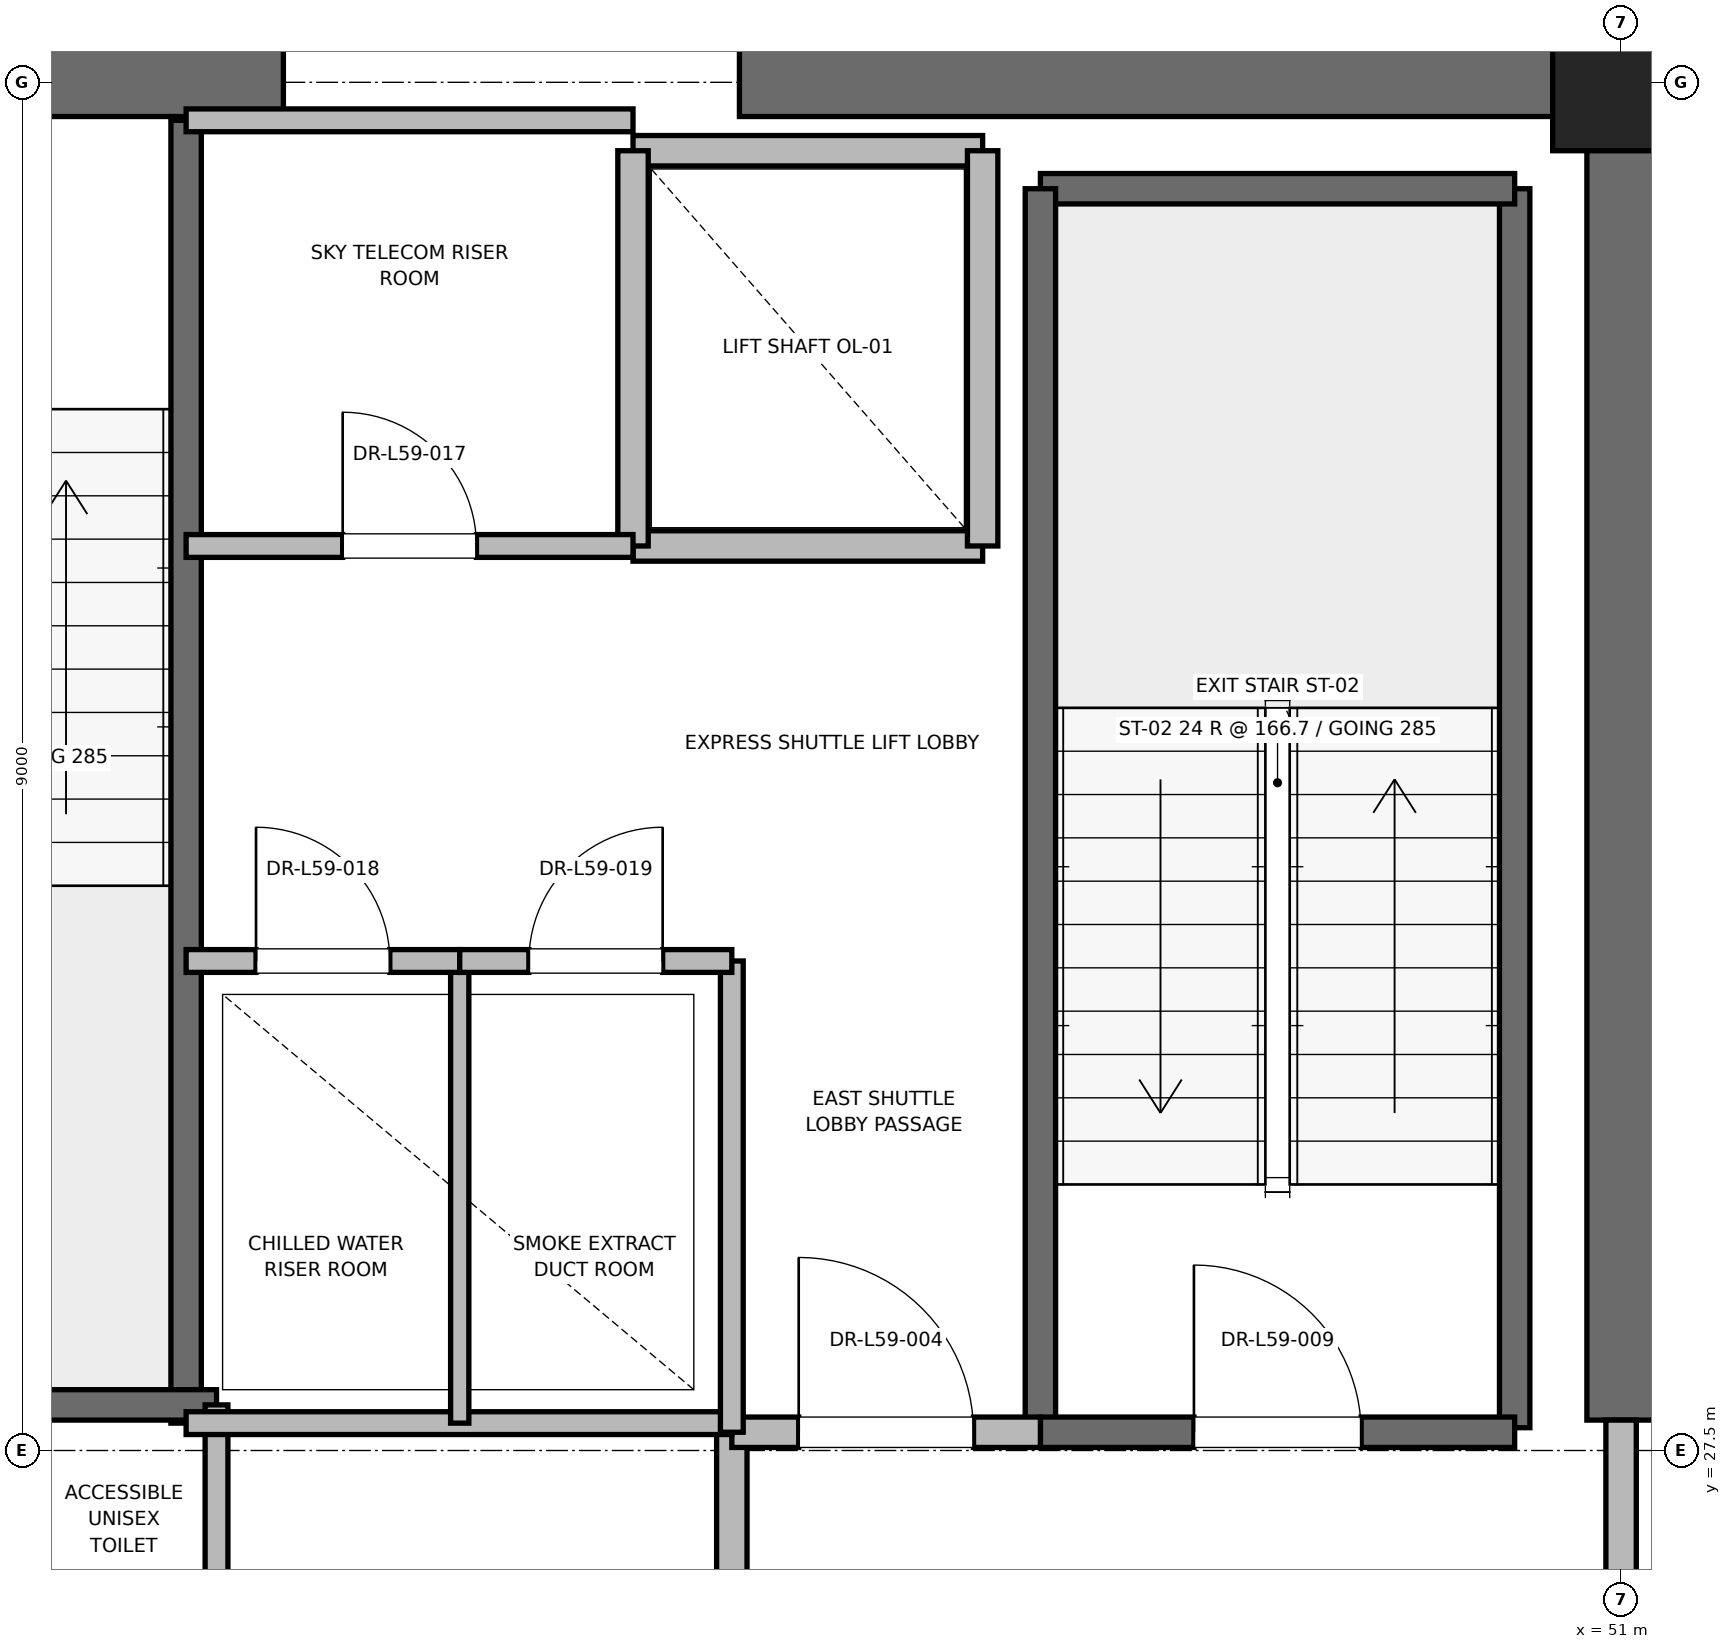
"""IFC4 building model, lengths in metres.
Left out: names, types, materials, properties, quantities, classifications, styles, units other than length and angle.
Written with IfcOpenShell. Run it as: python <this file> out.ifc"""

import sys

from ifc_helpers import new_model, si_unit, direction, frame, frame_2d, origin, origin_2d, place, context, subcontext, project, spatial, rectangle, extrude, element, fill, save


model = new_model("IFC4")
c1 = context("Model", 3, precision=1e-05, world=origin(), true_north=direction((0.0, 1.0)))
c2 = subcontext(c1, "Body", "Model", "MODEL_VIEW")
j1 = project(units=[si_unit("LENGTHUNIT", "METRE"), si_unit("PLANEANGLEUNIT", "RADIAN")], contexts=[c1])
p1 = place(None, origin())
s1 = spatial("IfcSite", under=j1, at=p1, CompositionType="ELEMENT")
p2 = place(p1, origin())
s2 = spatial("IfcBuilding", under=s1, at=p2, CompositionType="ELEMENT")
p3 = place(p2, frame((0.0, 0.0, 255.2)))
s3 = spatial("IfcBuildingStorey", under=s2, at=p3, CompositionType="ELEMENT", Elevation=255.2)
p4 = place(p3, frame((51.0, 36.5, 0.0), z_axis=(0.0, 0.0, 1.0), x_axis=(1.0, 0.0, 0.0)))
e1 = element("IfcColumn", 1, at=p4, inside=s3, PredefinedType="PILASTER", context=c2, shape_type="SweptSolid", body=[
    extrude(rectangle(XDim=0.9, YDim=0.9, at=origin_2d()), origin(), (0.0, 0.0, 1.0), 4.0),
])
p5 = place(p3, frame((37.8, 36.5, 0.0), z_axis=(0.0, 0.0, 1.0), x_axis=(1.0, 0.0, 0.0)))
e2 = element("IfcWall", 2, at=p5, inside=s3, PredefinedType="SHEAR", context=c2, shape_type="SweptSolid", body=[
    extrude(rectangle(XDim=4.4, YDim=0.45, at=frame_2d((2.2, 0.0))), origin(), (0.0, 0.0, 1.0), 3.785),
])
p6 = place(p5, frame((1.65, 0.0, 0.0)))
e3 = element("IfcOpeningElement", 3, at=p6, cuts=e2, PredefinedType="OPENING", context=c2, shape_type="SweptSolid", body=[
    extrude(rectangle(XDim=1.1, YDim=2.15, at=frame_2d((0.55, 1.075))), frame((0.0, 0.225, 0.0), z_axis=(0.0, -1.0, 0.0), x_axis=(1.0, 0.0, 0.0)), (0.0, 0.0, 1.0), 0.45),
])
p7 = place(p3, frame((45.2, 36.5, 0.0), z_axis=(0.0, 0.0, 1.0), x_axis=(1.0, 0.0, 0.0)))
e4 = element("IfcWall", 4, at=p7, inside=s3, PredefinedType="SHEAR", context=c2, shape_type="SweptSolid", body=[
    extrude(rectangle(XDim=5.8, YDim=0.45, at=frame_2d((2.9, 0.0))), origin(), (0.0, 0.0, 1.0), 3.785),
])
p8 = place(p3, frame((51.0, 27.7, 0.0), z_axis=(0.0, 0.0, 1.0), x_axis=(0.0, 1.0, 0.0)))
e5 = element("IfcWall", 5, at=p8, inside=s3, PredefinedType="SHEAR", context=c2, shape_type="SweptSolid", body=[
    extrude(rectangle(XDim=8.8, YDim=0.45, at=frame_2d((4.4, 0.0))), origin(), (0.0, 0.0, 1.0), 3.785),
])
p9 = place(p3, frame((50.3, 27.65, 0.0), z_axis=(0.0, 0.0, 1.0), x_axis=(0.0, 1.0, 0.0)))
e6 = element("IfcWall", 6, at=p9, inside=s3, PredefinedType="SOLIDWALL", context=c2, shape_type="SweptSolid", body=[
    extrude(rectangle(XDim=8.15, YDim=0.2, at=frame_2d((4.075, 0.0))), origin(), (0.0, 0.0, 1.0), 3.785),
])
p10 = place(p3, frame((47.18, 35.8, 0.0), z_axis=(0.0, 0.0, 1.0), x_axis=(1.0, 0.0, 0.0)))
e7 = element("IfcWall", 7, at=p10, inside=s3, PredefinedType="SOLIDWALL", context=c2, shape_type="SweptSolid", body=[
    extrude(rectangle(XDim=3.12, YDim=0.2, at=frame_2d((1.56, 0.0))), origin(), (0.0, 0.0, 1.0), 3.785),
])
p11 = place(p3, frame((47.18, 27.62, 0.0), z_axis=(0.0, 0.0, 1.0), x_axis=(0.0, 1.0, 0.0)))
e8 = element("IfcWall", 8, at=p11, inside=s3, PredefinedType="SOLIDWALL", context=c2, shape_type="SweptSolid", body=[
    extrude(rectangle(XDim=8.18, YDim=0.2, at=frame_2d((4.09, 0.0))), origin(), (0.0, 0.0, 1.0), 3.785),
])
p12 = place(p3, frame((47.18, 27.62, 0.0), z_axis=(0.0, 0.0, 1.0), x_axis=(1.0, 0.0, 0.0)))
e9 = element("IfcWall", 9, at=p12, inside=s3, PredefinedType="SOLIDWALL", context=c2, shape_type="SweptSolid", body=[
    extrude(rectangle(XDim=3.12, YDim=0.2, at=frame_2d((1.56, 0.0))), origin(), (0.0, 0.0, 1.0), 3.785),
])
p13 = place(p12, frame((1.01, 0.0, 0.0)))
e10 = element("IfcOpeningElement", 10, at=p13, cuts=e9, PredefinedType="OPENING", context=c2, shape_type="SweptSolid", body=[
    extrude(rectangle(XDim=1.1, YDim=2.15, at=frame_2d((0.55, 1.075))), frame((0.0, 0.1, 0.0), z_axis=(0.0, -1.0, 0.0), x_axis=(1.0, 0.0, 0.0)), (0.0, 0.0, 1.0), 0.2),
])
p14 = place(p3, frame((41.56, 27.68, 0.0), z_axis=(0.0, 0.0, 1.0), x_axis=(0.0, 1.0, 0.0)))
e11 = element("IfcWall", 11, at=p14, inside=s3, PredefinedType="SOLIDWALL", context=c2, shape_type="SweptSolid", body=[
    extrude(rectangle(XDim=8.57, YDim=0.2, at=frame_2d((4.285, 0.0))), origin(), (0.0, 0.0, 1.0), 3.785),
])
p15 = place(p3, frame((38.44, 27.8, 0.0), z_axis=(0.0, 0.0, 1.0), x_axis=(1.0, 0.0, 0.0)))
e12 = element("IfcWall", 12, at=p15, inside=s3, PredefinedType="SOLIDWALL", context=c2, shape_type="SweptSolid", body=[
    extrude(rectangle(XDim=3.32, YDim=0.2, at=frame_2d((1.66, 0.0))), origin(), (0.0, 0.0, 1.0), 3.785),
])
p16 = place(p3, frame((45.15, 24.25, 0.0), z_axis=(0.0, 0.0, 1.0), x_axis=(0.0, 1.0, 0.0)))
e13 = element("IfcWall", 13, at=p16, inside=s3, PredefinedType="PARTITIONING", context=c2, shape_type="SweptSolid", body=[
    extrude(rectangle(XDim=3.37, YDim=0.2, at=frame_2d((1.685, 0.0))), origin(), (0.0, 0.0, 1.0), 3.785),
])
p17 = place(p3, frame((45.15, 27.62, 0.0), z_axis=(0.0, 0.0, 1.0), x_axis=(1.0, 0.0, 0.0)))
e14 = element("IfcWall", 14, at=p17, inside=s3, PredefinedType="PARTITIONING", context=c2, shape_type="SweptSolid", body=[
    extrude(rectangle(XDim=2.03, YDim=0.2, at=frame_2d((1.015, 0.0))), origin(), (0.0, 0.0, 1.0), 3.785),
])
p18 = place(p17, frame((0.44, 0.0, 0.0)))
e15 = element("IfcOpeningElement", 15, at=p18, cuts=e14, PredefinedType="OPENING", context=c2, shape_type="SweptSolid", body=[
    extrude(rectangle(XDim=1.15, YDim=2.2, at=frame_2d((0.575, 1.1))), frame((0.0, 0.1, 0.0), z_axis=(0.0, -1.0, 0.0), x_axis=(1.0, 0.0, 0.0)), (0.0, 0.0, 1.0), 0.2),
])
p19 = place(p3, frame((51.0, 24.3, 0.0), z_axis=(0.0, 0.0, 1.0), x_axis=(0.0, 1.0, 0.0)))
e16 = element("IfcWall", 16, at=p19, inside=s3, PredefinedType="PARTITIONING", context=c2, shape_type="SweptSolid", body=[
    extrude(rectangle(XDim=3.4, YDim=0.2, at=frame_2d((1.7, 0.0))), origin(), (0.0, 0.0, 1.0), 2.865),
])
p20 = place(p19, frame((1.125, 0.0, 0.0)))
e17 = element("IfcOpeningElement", 17, at=p20, cuts=e16, PredefinedType="OPENING", context=c2, shape_type="SweptSolid", body=[
    extrude(rectangle(XDim=1.15, YDim=2.2, at=frame_2d((0.575, 1.1))), frame((0.0, 0.1, 0.0), z_axis=(0.0, -1.0, 0.0), x_axis=(1.0, 0.0, 0.0)), (0.0, 0.0, 1.0), 0.2),
])
p21 = place(p3, frame((44.5, 33.45, 0.0), z_axis=(0.0, 0.0, 1.0), x_axis=(1.0, 0.0, 0.0)))
e18 = element("IfcWall", 18, at=p21, inside=s3, PredefinedType="SOLIDWALL", context=c2, shape_type="SweptSolid", body=[
    extrude(rectangle(XDim=2.3, YDim=0.2, at=frame_2d((1.15, 0.0))), origin(), (0.0, 0.0, 1.0), 3.785),
])
p22 = place(p3, frame((46.8, 36.05, 0.0), z_axis=(0.0, 0.0, 1.0), x_axis=(-1.0, 0.0, 0.0)))
e19 = element("IfcWall", 19, at=p22, inside=s3, PredefinedType="SOLIDWALL", context=c2, shape_type="SweptSolid", body=[
    extrude(rectangle(XDim=2.3, YDim=0.2, at=frame_2d((1.15, 0.0))), origin(), (0.0, 0.0, 1.0), 2.865),
])
p23 = place(p3, frame((44.5, 36.05, 0.0), z_axis=(0.0, 0.0, 1.0), x_axis=(0.0, -1.0, 0.0)))
e20 = element("IfcWall", 20, at=p23, inside=s3, PredefinedType="SOLIDWALL", context=c2, shape_type="SweptSolid", body=[
    extrude(rectangle(XDim=2.6, YDim=0.2, at=frame_2d((1.3, 0.0))), origin(), (0.0, 0.0, 1.0), 2.865),
])
p24 = place(p3, frame((46.8, 33.45, 0.0), z_axis=(0.0, 0.0, 1.0), x_axis=(0.0, 1.0, 0.0)))
e21 = element("IfcWall", 21, at=p24, inside=s3, PredefinedType="SOLIDWALL", context=c2, shape_type="SweptSolid", body=[
    extrude(rectangle(XDim=2.6, YDim=0.2, at=frame_2d((1.3, 0.0))), origin(), (0.0, 0.0, 1.0), 3.785),
])
p25 = place(p3, frame((41.76, 23.8, 0.0), z_axis=(0.0, 0.0, 1.0), x_axis=(0.0, 1.0, 0.0)))
e22 = element("IfcWall", 22, at=p25, inside=s3, PredefinedType="PARTITIONING", context=c2, shape_type="SweptSolid", body=[
    extrude(rectangle(XDim=4.0, YDim=0.15, at=frame_2d((2.0, 0.0))), origin(), (0.0, 0.0, 1.0), 2.85),
])
p26 = place(p3, frame((41.56, 27.68, 0.0), z_axis=(0.0, 0.0, 1.0), x_axis=(1.0, 0.0, 0.0)))
e23 = element("IfcWall", 23, at=p26, inside=s3, PredefinedType="PARTITIONING", context=c2, shape_type="SweptSolid", body=[
    extrude(rectangle(XDim=3.59, YDim=0.15, at=frame_2d((1.795, 0.0))), origin(), (0.0, 0.0, 1.0), 2.85),
])
p27 = place(p3, frame((45.15, 27.62, 0.0), z_axis=(0.0, 0.0, 1.0), x_axis=(0.0, 1.0, 0.0)))
e24 = element("IfcWall", 24, at=p27, inside=s3, PredefinedType="PARTITIONING", context=c2, shape_type="SweptSolid", body=[
    extrude(rectangle(XDim=3.1, YDim=0.15, at=frame_2d((1.55, 0.0))), origin(), (0.0, 0.0, 1.0), 2.85),
])
p28 = place(p3, frame((43.36, 27.68, 0.0), z_axis=(0.0, 0.0, 1.0), x_axis=(0.0, 1.0, 0.0)))
e25 = element("IfcWall", 25, at=p28, inside=s3, PredefinedType="PARTITIONING", context=c2, shape_type="SweptSolid", body=[
    extrude(rectangle(XDim=3.04, YDim=0.12, at=frame_2d((1.52, 0.0))), origin(), (0.0, 0.0, 1.0), 2.85),
])
p29 = place(p3, frame((41.56, 30.72, 0.0), z_axis=(0.0, 0.0, 1.0), x_axis=(1.0, 0.0, 0.0)))
e26 = element("IfcWall", 26, at=p29, inside=s3, PredefinedType="PARTITIONING", context=c2, shape_type="SweptSolid", body=[
    extrude(rectangle(XDim=1.8, YDim=0.15, at=frame_2d((0.9, 0.0))), origin(), (0.0, 0.0, 1.0), 2.85),
])
p30 = place(p29, frame((0.46, 0.0, 0.0)))
e27 = element("IfcOpeningElement", 27, at=p30, cuts=e26, PredefinedType="OPENING", context=c2, shape_type="SweptSolid", body=[
    extrude(rectangle(XDim=0.88, YDim=2.1, at=frame_2d((0.44, 1.05))), frame((0.0, 0.075, 0.0), z_axis=(0.0, -1.0, 0.0), x_axis=(1.0, 0.0, 0.0)), (0.0, 0.0, 1.0), 0.15),
])
p31 = place(p3, frame((43.36, 30.72, 0.0), z_axis=(0.0, 0.0, 1.0), x_axis=(1.0, 0.0, 0.0)))
e28 = element("IfcWall", 28, at=p31, inside=s3, PredefinedType="PARTITIONING", context=c2, shape_type="SweptSolid", body=[
    extrude(rectangle(XDim=1.79, YDim=0.15, at=frame_2d((0.895, 0.0))), origin(), (0.0, 0.0, 1.0), 2.85),
])
p32 = place(p31, frame((0.455, 0.0, 0.0)))
e29 = element("IfcOpeningElement", 29, at=p32, cuts=e28, PredefinedType="OPENING", context=c2, shape_type="SweptSolid", body=[
    extrude(rectangle(XDim=0.88, YDim=2.1, at=frame_2d((0.44, 1.05))), frame((0.0, 0.075, 0.0), z_axis=(0.0, -1.0, 0.0), x_axis=(1.0, 0.0, 0.0)), (0.0, 0.0, 1.0), 0.15),
])
p33 = place(p3, frame((41.56, 36.25, 0.0), z_axis=(0.0, 0.0, 1.0), x_axis=(1.0, 0.0, 0.0)))
e30 = element("IfcWall", 30, at=p33, inside=s3, PredefinedType="PARTITIONING", context=c2, shape_type="SweptSolid", body=[
    extrude(rectangle(XDim=2.94, YDim=0.15, at=frame_2d((1.47, 0.0))), origin(), (0.0, 0.0, 1.0), 2.85),
])
p34 = place(p3, frame((41.56, 33.45, 0.0), z_axis=(0.0, 0.0, 1.0), x_axis=(1.0, 0.0, 0.0)))
e31 = element("IfcWall", 31, at=p34, inside=s3, PredefinedType="PARTITIONING", context=c2, shape_type="SweptSolid", body=[
    extrude(rectangle(XDim=2.94, YDim=0.15, at=frame_2d((1.47, 0.0))), origin(), (0.0, 0.0, 1.0), 2.85),
])
p35 = place(p34, frame((1.03, 0.0, 0.0)))
e32 = element("IfcOpeningElement", 32, at=p35, cuts=e31, PredefinedType="OPENING", context=c2, shape_type="SweptSolid", body=[
    extrude(rectangle(XDim=0.88, YDim=2.1, at=frame_2d((0.44, 1.05))), frame((0.0, 0.075, 0.0), z_axis=(0.0, -1.0, 0.0), x_axis=(1.0, 0.0, 0.0)), (0.0, 0.0, 1.0), 0.15),
])
p36 = place(p13, origin())
e33 = element("IfcDoor", 33, at=p36, inside=s3, OperationType="SINGLE_SWING_LEFT", PredefinedType="DOOR", context=c2, shape_type="SweptSolid", body=[
    extrude(rectangle(XDim=1.1, YDim=2.15, at=frame_2d((0.55, 1.075))), frame((0.0, 0.025, 0.0), z_axis=(0.0, -1.0, 0.0), x_axis=(1.0, 0.0, 0.0)), (0.0, 0.0, 1.0), 0.05),
])
fill(e10, e33)
p37 = place(p18, origin())
e34 = element("IfcDoor", 34, at=p37, inside=s3, OperationType="SINGLE_SWING_LEFT", PredefinedType="DOOR", context=c2, shape_type="SweptSolid", body=[
    extrude(rectangle(XDim=1.15, YDim=2.2, at=frame_2d((0.575, 1.1))), frame((0.0, 0.025, 0.0), z_axis=(0.0, -1.0, 0.0), x_axis=(1.0, 0.0, 0.0)), (0.0, 0.0, 1.0), 0.05),
])
fill(e15, e34)
p38 = place(p30, origin())
e35 = element("IfcDoor", 35, at=p38, inside=s3, OperationType="SINGLE_SWING_LEFT", PredefinedType="DOOR", context=c2, shape_type="SweptSolid", body=[
    extrude(rectangle(XDim=0.88, YDim=2.1, at=frame_2d((0.44, 1.05))), frame((0.0, 0.025, 0.0), z_axis=(0.0, -1.0, 0.0), x_axis=(1.0, 0.0, 0.0)), (0.0, 0.0, 1.0), 0.05),
])
fill(e27, e35)
p39 = place(p32, origin())
e36 = element("IfcDoor", 36, at=p39, inside=s3, OperationType="SINGLE_SWING_RIGHT", PredefinedType="DOOR", context=c2, shape_type="SweptSolid", body=[
    extrude(rectangle(XDim=0.88, YDim=2.1, at=frame_2d((0.44, 1.05))), frame((0.0, 0.025, 0.0), z_axis=(0.0, -1.0, 0.0), x_axis=(1.0, 0.0, 0.0)), (0.0, 0.0, 1.0), 0.05),
])
fill(e29, e36)
p40 = place(p35, origin())
e37 = element("IfcDoor", 37, at=p40, inside=s3, OperationType="SINGLE_SWING_LEFT", PredefinedType="DOOR", context=c2, shape_type="SweptSolid", body=[
    extrude(rectangle(XDim=0.88, YDim=2.1, at=frame_2d((0.44, 1.05))), frame((0.0, 0.025, 0.0), z_axis=(0.0, -1.0, 0.0), x_axis=(1.0, 0.0, 0.0)), (0.0, 0.0, 1.0), 0.05),
])
fill(e32, e37)
save(model, sys.argv[1])
